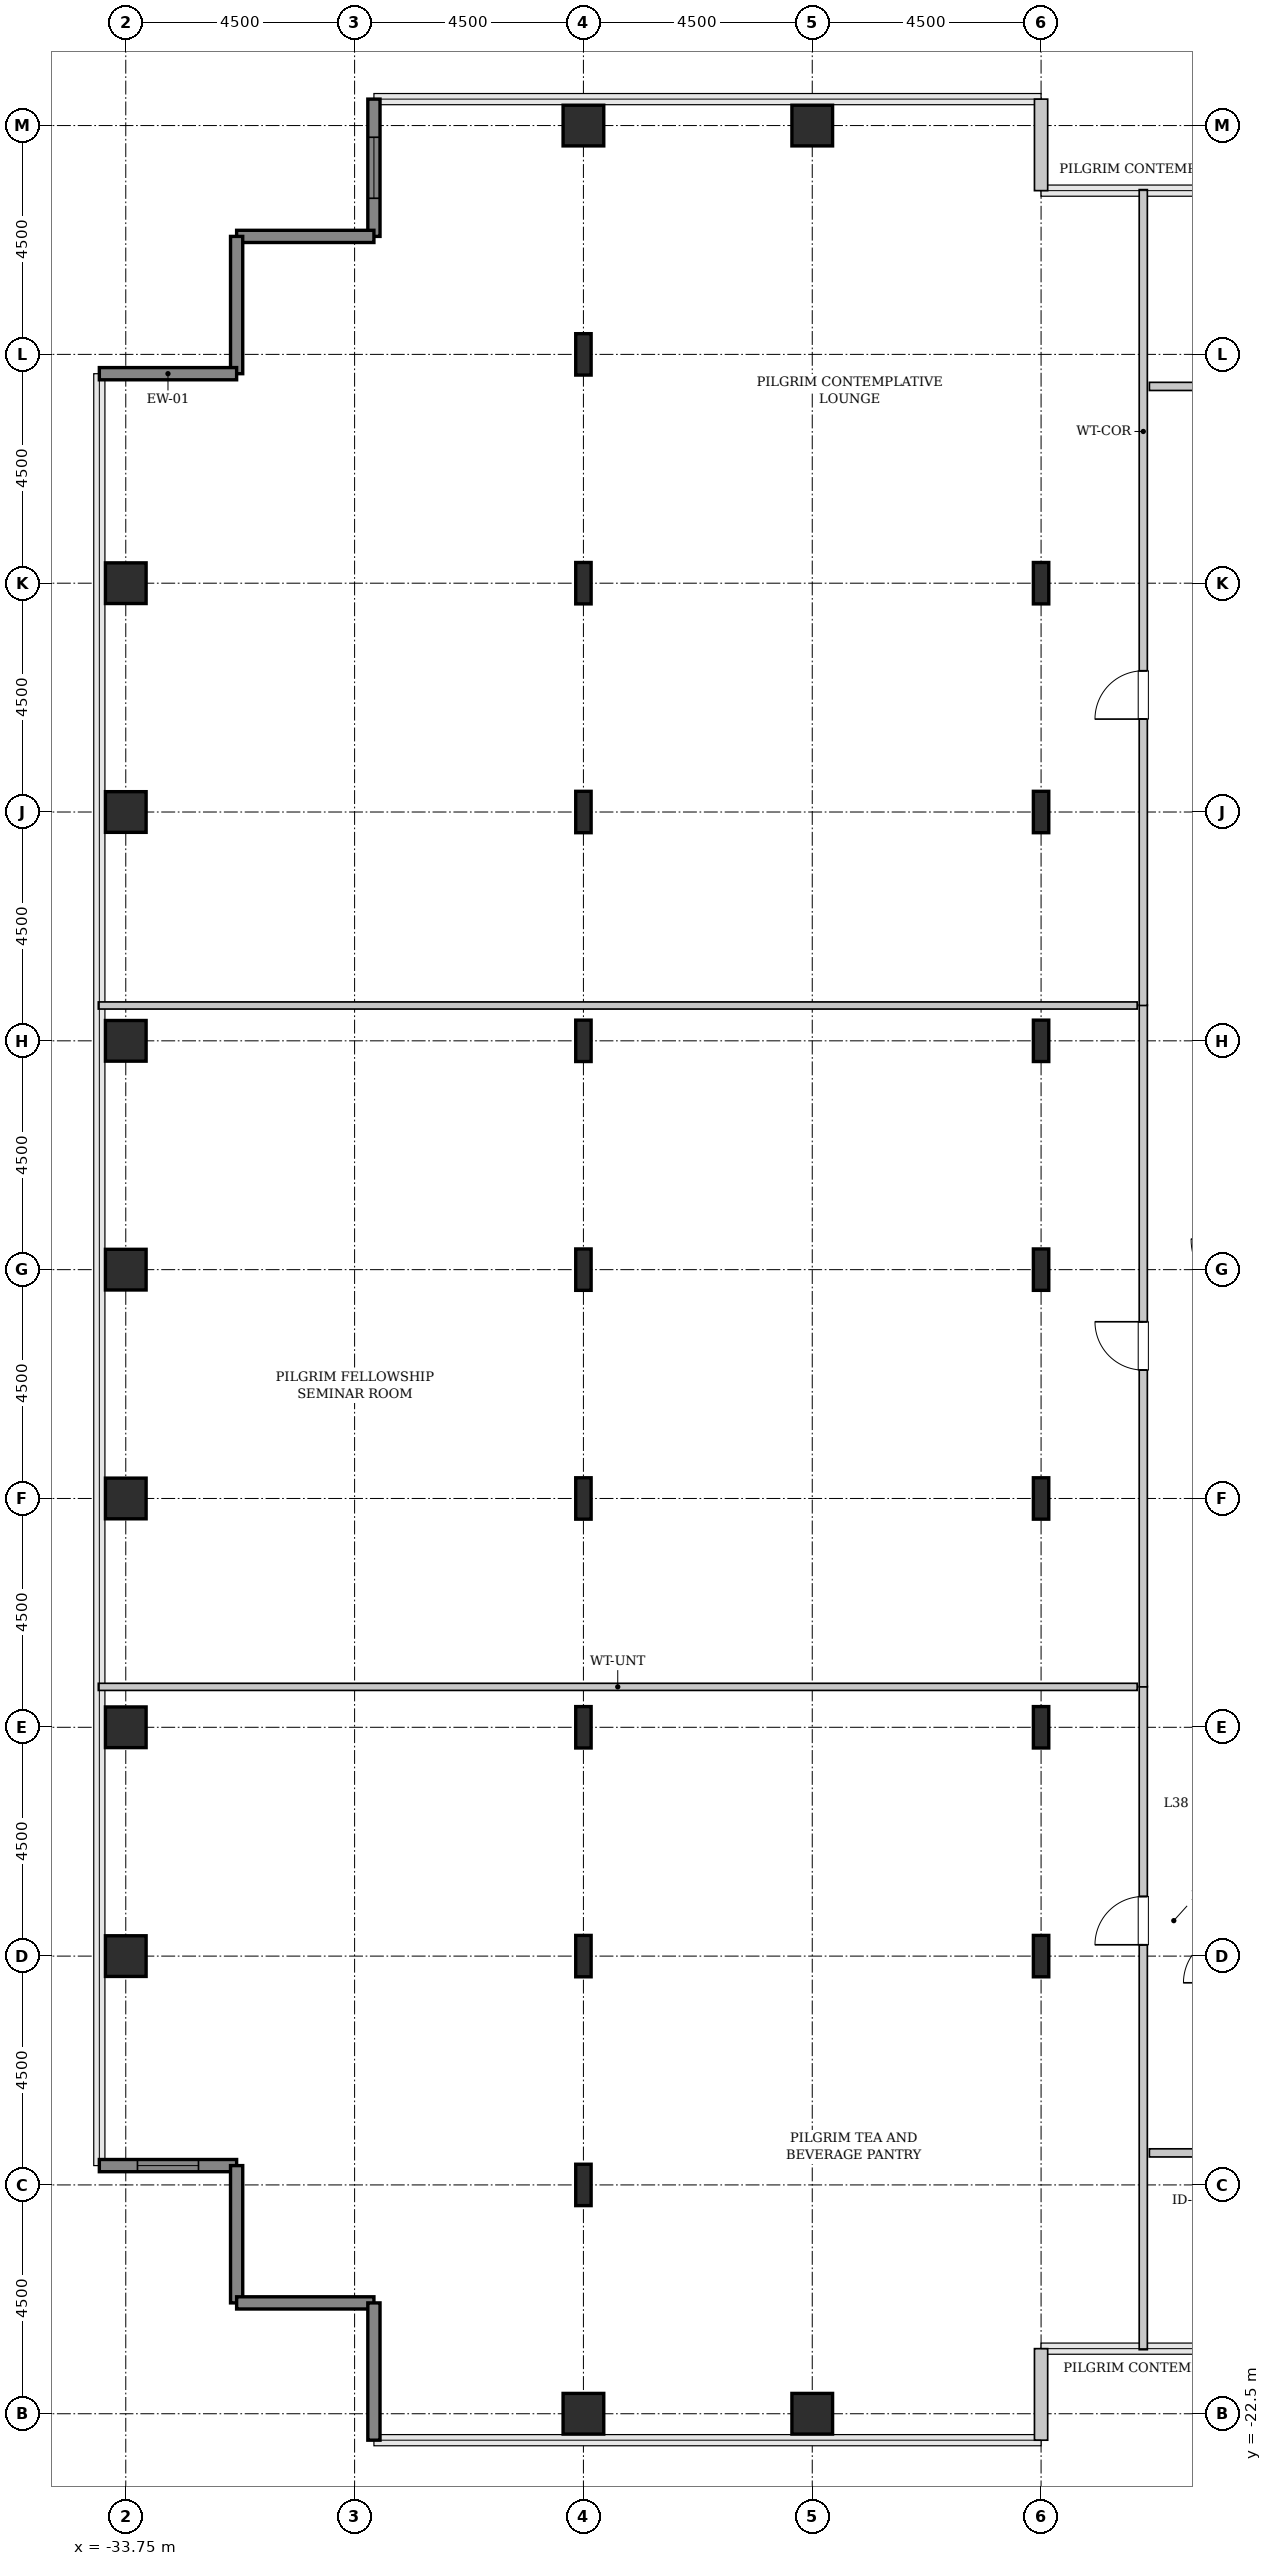
"""IFC4 building model, lengths in metres.
Left out: names, types, materials, properties, quantities, classifications, styles, units other than length and angle.
Written with IfcOpenShell. Run it as: python <this file> out.ifc"""

import sys

from ifc_helpers import new_model, si_unit, direction, frame, frame_2d, origin, origin_2d, place, context, subcontext, project, spatial, rectangle, hollow_rectangle, i_section, extrude, source, transform, mapped, element, fill, save


model = new_model("IFC4")
c1 = context("Model", 3, precision=1e-05, world=origin(), true_north=direction((0.0, 1.0)))
c2 = subcontext(c1, "Body", "Model", "MODEL_VIEW")
j1 = project(units=[si_unit("LENGTHUNIT", "METRE"), si_unit("PLANEANGLEUNIT", "RADIAN")], contexts=[c1])
p1 = place(None, origin())
s1 = spatial("IfcSite", under=j1, at=p1, CompositionType="ELEMENT")
p2 = place(p1, origin())
s2 = spatial("IfcBuilding", under=s1, at=p2, CompositionType="ELEMENT")
p3 = place(p2, frame((0.0, 0.0, 156.4)))
s3 = spatial("IfcBuildingStorey", under=s2, at=p3, CompositionType="ELEMENT", Elevation=156.4)
m1 = source(origin(), c2, "Body", "SweptSolid", [
    extrude(hollow_rectangle(XDim=0.8, YDim=0.8, WallThickness=0.04, InnerFilletRadius=0.04, OuterFilletRadius=0.08, at=origin_2d()), origin(), (0.0, 0.0, 1.0), 3.8),
])
for number, where, z_axis, x_axis in (
    (1, (-33.75, -13.5, 0.0), (0.0, 0.0, 1.0), (1.0, 0.0, 0.0)),
    (2, (-33.75, -9.0, 0.0), (0.0, 0.0, 1.0), (1.0, 0.0, 0.0)),
    (3, (-33.75, -4.5, 0.0), (0.0, 0.0, 1.0), (1.0, 0.0, 0.0)),
    (4, (-33.75, 0.0, 0.0), (0.0, 0.0, 1.0), (1.0, 0.0, 0.0)),
    (5, (-33.75, 4.5, 0.0), (0.0, 0.0, 1.0), (1.0, 0.0, 0.0)),
    (6, (-33.75, 9.0, 0.0), (0.0, 0.0, 1.0), (1.0, 0.0, 0.0)),
    (7, (-33.75, 13.5, 0.0), (0.0, 0.0, 1.0), (1.0, 0.0, 0.0)),
    (8, (-24.75, -22.5, 0.0), (0.0, 0.0, 1.0), (1.0, 0.0, 0.0)),
):
    element("IfcColumn", number, at=place(p3, frame(where, z_axis=z_axis, x_axis=x_axis)), inside=s3, PredefinedType="COLUMN", context=c2, shape_type="MappedRepresentation", body=[
        mapped(m1, transform((0.0, 0.0, 0.0), x_axis=(1.0, 0.0, 0.0), y_axis=(0.0, 1.0, 0.0), z_axis=(0.0, 0.0, 1.0), scale=1.0)),
    ])
m2 = source(origin(), c2, "Body", "SweptSolid", [
    extrude(i_section(OverallWidth=0.303, OverallDepth=0.814, WebThickness=0.021, FlangeThickness=0.04, FilletRadius=0.03, at=origin_2d()), origin(), (0.0, 0.0, 1.0), 3.8),
])
for number, where, z_axis, x_axis in (
    (9, (-24.75, -18.0, 0.0), (0.0, 0.0, 1.0), (1.0, 0.0, 0.0)),
    (10, (-24.75, -13.5, 0.0), (0.0, 0.0, 1.0), (1.0, 0.0, 0.0)),
    (11, (-24.75, -9.0, 0.0), (0.0, 0.0, 1.0), (1.0, 0.0, 0.0)),
    (12, (-24.75, -4.5, 0.0), (0.0, 0.0, 1.0), (1.0, 0.0, 0.0)),
    (13, (-24.75, 0.0, 0.0), (0.0, 0.0, 1.0), (1.0, 0.0, 0.0)),
    (14, (-24.75, 4.5, 0.0), (0.0, 0.0, 1.0), (1.0, 0.0, 0.0)),
    (15, (-24.75, 9.0, 0.0), (0.0, 0.0, 1.0), (1.0, 0.0, 0.0)),
    (16, (-24.75, 13.5, 0.0), (0.0, 0.0, 1.0), (1.0, 0.0, 0.0)),
    (17, (-24.75, 18.0, 0.0), (0.0, 0.0, 1.0), (1.0, 0.0, 0.0)),
):
    element("IfcColumn", number, at=place(p3, frame(where, z_axis=z_axis, x_axis=x_axis)), inside=s3, PredefinedType="COLUMN", context=c2, shape_type="MappedRepresentation", body=[
        mapped(m2, transform((0.0, 0.0, 0.0), x_axis=(1.0, 0.0, 0.0), y_axis=(0.0, 1.0, 0.0), z_axis=(0.0, 0.0, 1.0), scale=1.0)),
    ])
for number, where, z_axis, x_axis in (
    (18, (-24.75, 22.5, 0.0), (0.0, 0.0, 1.0), (1.0, 0.0, 0.0)),
    (19, (-20.25, -22.5, 0.0), (0.0, 0.0, 1.0), (1.0, 0.0, 0.0)),
    (20, (-20.25, 22.5, 0.0), (0.0, 0.0, 1.0), (1.0, 0.0, 0.0)),
):
    element("IfcColumn", number, at=place(p3, frame(where, z_axis=z_axis, x_axis=x_axis)), inside=s3, PredefinedType="COLUMN", context=c2, shape_type="MappedRepresentation", body=[
        mapped(m1, transform((0.0, 0.0, 0.0), x_axis=(1.0, 0.0, 0.0), y_axis=(0.0, 1.0, 0.0), z_axis=(0.0, 0.0, 1.0), scale=1.0)),
    ])
for number, where, z_axis, x_axis in (
    (21, (-15.75, -13.5, 0.0), (0.0, 0.0, 1.0), (1.0, 0.0, 0.0)),
    (22, (-15.75, -9.0, 0.0), (0.0, 0.0, 1.0), (1.0, 0.0, 0.0)),
    (23, (-15.75, -4.5, 0.0), (0.0, 0.0, 1.0), (1.0, 0.0, 0.0)),
    (24, (-15.75, 0.0, 0.0), (0.0, 0.0, 1.0), (1.0, 0.0, 0.0)),
    (25, (-15.75, 4.5, 0.0), (0.0, 0.0, 1.0), (1.0, 0.0, 0.0)),
    (26, (-15.75, 9.0, 0.0), (0.0, 0.0, 1.0), (1.0, 0.0, 0.0)),
    (27, (-15.75, 13.5, 0.0), (0.0, 0.0, 1.0), (1.0, 0.0, 0.0)),
):
    element("IfcColumn", number, at=place(p3, frame(where, z_axis=z_axis, x_axis=x_axis)), inside=s3, PredefinedType="COLUMN", context=c2, shape_type="MappedRepresentation", body=[
        mapped(m2, transform((0.0, 0.0, 0.0), x_axis=(1.0, 0.0, 0.0), y_axis=(0.0, 1.0, 0.0), z_axis=(0.0, 0.0, 1.0), scale=1.0)),
    ])
m3 = source(origin(), c2, "Body", "SweptSolid", [
    extrude(rectangle(XDim=1.8, YDim=0.26, at=frame_2d((0.9, 0.0))), origin(), (0.0, 0.0, 1.0), 3.55),
])
p4 = place(p3, frame((-15.75, 21.22, 0.0), z_axis=(0.0, 0.0, 1.0), x_axis=(0.0, 1.0, 0.0)))
e28 = element("IfcWall", 28, at=p4, inside=s3, PredefinedType="SOLIDWALL", context=c2, shape_type="MappedRepresentation", body=[
    mapped(m3, transform((0.0, 0.0, 0.0), x_axis=(1.0, 0.0, 0.0), y_axis=(0.0, 1.0, 0.0), z_axis=(0.0, 0.0, 1.0), scale=1.0)),
])
m4 = source(origin(), c2, "Body", "SweptSolid", [
    extrude(rectangle(XDim=2.7, YDim=0.24, at=frame_2d((1.35, 0.0))), origin(), (0.0, 0.0, 1.0), 3.55),
])
p5 = place(p3, frame((-28.87, 23.02, 0.0), z_axis=(0.0, 0.0, 1.0), x_axis=(0.0, -1.0, 0.0)))
e29 = element("IfcWall", 29, at=p5, inside=s3, PredefinedType="SHEAR", context=c2, shape_type="MappedRepresentation", body=[
    mapped(m4, transform((0.0, 0.0, 0.0), x_axis=(1.0, 0.0, 0.0), y_axis=(0.0, 1.0, 0.0), z_axis=(0.0, 0.0, 1.0), scale=1.0)),
])
p6 = place(p5, frame((0.75, 0.0, 0.85)))
e30 = element("IfcOpeningElement", 30, at=p6, cuts=e29, PredefinedType="OPENING", context=c2, shape_type="SweptSolid", body=[
    extrude(rectangle(XDim=1.2, YDim=1.8, at=frame_2d((0.6, 0.9))), frame((0.0, 0.13, 0.0), z_axis=(0.0, -1.0, 0.0), x_axis=(1.0, 0.0, 0.0)), (0.0, 0.0, 1.0), 0.26),
])
for number, where, z_axis, x_axis in (
    (31, (-28.87, 20.32, 0.0), (0.0, 0.0, 1.0), (-1.0, 0.0, 0.0)),
    (32, (-31.57, 20.32, 0.0), (0.0, 0.0, 1.0), (0.0, -1.0, 0.0)),
    (33, (-31.57, 17.62, 0.0), (0.0, 0.0, 1.0), (-1.0, 0.0, 0.0)),
):
    element("IfcWall", number, at=place(p3, frame(where, z_axis=z_axis, x_axis=x_axis)), inside=s3, PredefinedType="SHEAR", context=c2, shape_type="MappedRepresentation", body=[
        mapped(m4, transform((0.0, 0.0, 0.0), x_axis=(1.0, 0.0, 0.0), y_axis=(0.0, 1.0, 0.0), z_axis=(0.0, 0.0, 1.0), scale=1.0)),
    ])
p7 = place(p3, frame((-34.27, -17.62, 0.0), z_axis=(0.0, 0.0, 1.0), x_axis=(1.0, 0.0, 0.0)))
e34 = element("IfcWall", 34, at=p7, inside=s3, PredefinedType="SHEAR", context=c2, shape_type="MappedRepresentation", body=[
    mapped(m4, transform((0.0, 0.0, 0.0), x_axis=(1.0, 0.0, 0.0), y_axis=(0.0, 1.0, 0.0), z_axis=(0.0, 0.0, 1.0), scale=1.0)),
])
p8 = place(p7, frame((0.75, 0.0, 0.85)))
e35 = element("IfcOpeningElement", 35, at=p8, cuts=e34, PredefinedType="OPENING", context=c2, shape_type="SweptSolid", body=[
    extrude(rectangle(XDim=1.2, YDim=1.8, at=frame_2d((0.6, 0.9))), frame((0.0, 0.13, 0.0), z_axis=(0.0, -1.0, 0.0), x_axis=(1.0, 0.0, 0.0)), (0.0, 0.0, 1.0), 0.26),
])
for number, where, z_axis, x_axis in (
    (36, (-31.57, -17.62, 0.0), (0.0, 0.0, 1.0), (0.0, -1.0, 0.0)),
    (37, (-31.57, -20.32, 0.0), (0.0, 0.0, 1.0), (1.0, 0.0, 0.0)),
    (38, (-28.87, -20.32, 0.0), (0.0, 0.0, 1.0), (0.0, -1.0, 0.0)),
):
    element("IfcWall", number, at=place(p3, frame(where, z_axis=z_axis, x_axis=x_axis)), inside=s3, PredefinedType="SHEAR", context=c2, shape_type="MappedRepresentation", body=[
        mapped(m4, transform((0.0, 0.0, 0.0), x_axis=(1.0, 0.0, 0.0), y_axis=(0.0, 1.0, 0.0), z_axis=(0.0, 0.0, 1.0), scale=1.0)),
    ])
p9 = place(p3, frame((-15.75, -23.02, 0.0), z_axis=(0.0, 0.0, 1.0), x_axis=(0.0, 1.0, 0.0)))
e39 = element("IfcWall", 39, at=p9, inside=s3, PredefinedType="SOLIDWALL", context=c2, shape_type="MappedRepresentation", body=[
    mapped(m3, transform((0.0, 0.0, 0.0), x_axis=(1.0, 0.0, 0.0), y_axis=(0.0, 1.0, 0.0), z_axis=(0.0, 0.0, 1.0), scale=1.0)),
])
m5 = source(origin(), c2, "Body", "SweptSolid", [
    extrude(rectangle(XDim=13.045, YDim=0.16, at=frame_2d((6.522, 0.0))), origin(), (0.0, 0.0, 1.0), 3.535),
])
p10 = place(p3, frame((-13.74, -21.24, 0.0), z_axis=(0.0, 0.0, 1.0), x_axis=(0.0, 1.0, 0.0)))
e40 = element("IfcWall", 40, at=p10, inside=s3, PredefinedType="PARTITIONING", context=c2, shape_type="MappedRepresentation", body=[
    mapped(m5, transform((0.0, 0.0, 0.0), x_axis=(1.0, 0.0, 0.0), y_axis=(0.0, 1.0, 0.0), z_axis=(0.0, 0.0, 1.0), scale=1.0)),
])
p11 = place(p10, frame((7.962, 0.0, 0.0)))
e41 = element("IfcOpeningElement", 41, at=p11, cuts=e40, PredefinedType="OPENING", context=c2, shape_type="SweptSolid", body=[
    extrude(rectangle(XDim=0.95, YDim=2.1, at=frame_2d((0.475, 1.05))), frame((0.0, 0.09, 0.0), z_axis=(0.0, -1.0, 0.0), x_axis=(1.0, 0.0, 0.0)), (0.0, 0.0, 1.0), 0.18),
])
m6 = source(origin(), c2, "Body", "SweptSolid", [
    extrude(rectangle(XDim=20.43, YDim=0.14, at=frame_2d((10.215, 0.0))), origin(), (0.0, 0.0, 1.0), 3.535),
])
p12 = place(p3, frame((-34.29, -8.205, 0.0), z_axis=(0.0, 0.0, 1.0), x_axis=(1.0, 0.0, 0.0)))
e42 = element("IfcWall", 42, at=p12, inside=s3, PredefinedType="PARTITIONING", context=c2, shape_type="MappedRepresentation", body=[
    mapped(m6, transform((0.0, 0.0, 0.0), x_axis=(1.0, 0.0, 0.0), y_axis=(0.0, 1.0, 0.0), z_axis=(0.0, 0.0, 1.0), scale=1.0)),
])
m7 = source(origin(), c2, "Body", "SweptSolid", [
    extrude(rectangle(XDim=13.41, YDim=0.16, at=frame_2d((6.705, 0.0))), origin(), (0.0, 0.0, 1.0), 3.535),
])
p13 = place(p3, frame((-13.74, -8.205, 0.0), z_axis=(0.0, 0.0, 1.0), x_axis=(0.0, 1.0, 0.0)))
e43 = element("IfcWall", 43, at=p13, inside=s3, PredefinedType="PARTITIONING", context=c2, shape_type="MappedRepresentation", body=[
    mapped(m7, transform((0.0, 0.0, 0.0), x_axis=(1.0, 0.0, 0.0), y_axis=(0.0, 1.0, 0.0), z_axis=(0.0, 0.0, 1.0), scale=1.0)),
])
p14 = place(p13, frame((6.23, 0.0, 0.0)))
e44 = element("IfcOpeningElement", 44, at=p14, cuts=e43, PredefinedType="OPENING", context=c2, shape_type="SweptSolid", body=[
    extrude(rectangle(XDim=0.95, YDim=2.1, at=frame_2d((0.475, 1.05))), frame((0.0, 0.09, 0.0), z_axis=(0.0, -1.0, 0.0), x_axis=(1.0, 0.0, 0.0)), (0.0, 0.0, 1.0), 0.18),
])
p15 = place(p3, frame((-34.29, 5.195, 0.0), z_axis=(0.0, 0.0, 1.0), x_axis=(1.0, 0.0, 0.0)))
e45 = element("IfcWall", 45, at=p15, inside=s3, PredefinedType="PARTITIONING", context=c2, shape_type="MappedRepresentation", body=[
    mapped(m6, transform((0.0, 0.0, 0.0), x_axis=(1.0, 0.0, 0.0), y_axis=(0.0, 1.0, 0.0), z_axis=(0.0, 0.0, 1.0), scale=1.0)),
])
m8 = source(origin(), c2, "Body", "SweptSolid", [
    extrude(rectangle(XDim=16.045, YDim=0.16, at=frame_2d((8.022, 0.0))), origin(), (0.0, 0.0, 1.0), 3.535),
])
p16 = place(p3, frame((-13.74, 5.195, 0.0), z_axis=(0.0, 0.0, 1.0), x_axis=(0.0, 1.0, 0.0)))
e46 = element("IfcWall", 46, at=p16, inside=s3, PredefinedType="PARTITIONING", context=c2, shape_type="MappedRepresentation", body=[
    mapped(m8, transform((0.0, 0.0, 0.0), x_axis=(1.0, 0.0, 0.0), y_axis=(0.0, 1.0, 0.0), z_axis=(0.0, 0.0, 1.0), scale=1.0)),
])
p17 = place(p16, frame((5.633, 0.0, 0.0)))
e47 = element("IfcOpeningElement", 47, at=p17, cuts=e46, PredefinedType="OPENING", context=c2, shape_type="SweptSolid", body=[
    extrude(rectangle(XDim=0.95, YDim=2.1, at=frame_2d((0.475, 1.05))), frame((0.0, 0.09, 0.0), z_axis=(0.0, -1.0, 0.0), x_axis=(1.0, 0.0, 0.0)), (0.0, 0.0, 1.0), 0.18),
])
m9 = source(origin(), c2, "Body", "SweptSolid", [
    extrude(rectangle(XDim=4.16, YDim=0.16, at=frame_2d((2.08, 0.0))), origin(), (0.0, 0.0, 1.0), 3.535),
])
p18 = place(p3, frame((-13.62, 17.37, 0.0), z_axis=(0.0, 0.0, 1.0), x_axis=(1.0, 0.0, 0.0)))
e48 = element("IfcWall", 48, at=p18, inside=s3, PredefinedType="PARTITIONING", context=c2, shape_type="MappedRepresentation", body=[
    mapped(m9, transform((0.0, 0.0, 0.0), x_axis=(1.0, 0.0, 0.0), y_axis=(0.0, 1.0, 0.0), z_axis=(0.0, 0.0, 1.0), scale=1.0)),
])
p19 = place(p18, frame((0.969, 0.0, 0.0)))
e49 = element("IfcOpeningElement", 49, at=p19, cuts=e48, PredefinedType="OPENING", context=c2, shape_type="SweptSolid", body=[
    extrude(rectangle(XDim=0.95, YDim=2.1, at=frame_2d((0.475, 1.05))), frame((0.0, 0.09, 0.0), z_axis=(0.0, -1.0, 0.0), x_axis=(1.0, 0.0, 0.0)), (0.0, 0.0, 1.0), 0.18),
])
m10 = source(origin(), c2, "Body", "SweptSolid", [
    extrude(rectangle(XDim=4.425, YDim=0.16, at=frame_2d((2.212, 0.0))), origin(), (0.0, 0.0, 1.0), 3.535),
])
p20 = place(p3, frame((-13.62, -17.37, 0.0), z_axis=(0.0, 0.0, 1.0), x_axis=(1.0, 0.0, 0.0)))
e50 = element("IfcWall", 50, at=p20, inside=s3, PredefinedType="PARTITIONING", context=c2, shape_type="MappedRepresentation", body=[
    mapped(m10, transform((0.0, 0.0, 0.0), x_axis=(1.0, 0.0, 0.0), y_axis=(0.0, 1.0, 0.0), z_axis=(0.0, 0.0, 1.0), scale=1.0)),
])
p21 = place(p20, frame((1.038, 0.0, 0.0)))
e51 = element("IfcOpeningElement", 51, at=p21, cuts=e50, PredefinedType="OPENING", context=c2, shape_type="SweptSolid", body=[
    extrude(rectangle(XDim=0.95, YDim=2.1, at=frame_2d((0.475, 1.05))), frame((0.0, 0.09, 0.0), z_axis=(0.0, -1.0, 0.0), x_axis=(1.0, 0.0, 0.0)), (0.0, 0.0, 1.0), 0.18),
])
m11 = source(origin(), c2, "Body", "SweptSolid", [
    extrude(rectangle(XDim=1.2, YDim=1.8, at=frame_2d((0.6, 0.9))), frame((0.0, 0.03, 0.0), z_axis=(0.0, -1.0, 0.0), x_axis=(1.0, 0.0, 0.0)), (0.0, 0.0, 1.0), 0.06),
])
p22 = place(p6, origin())
e52 = element("IfcWindow", 52, at=p22, inside=s3, PartitioningType="SINGLE_PANEL", PredefinedType="WINDOW", context=c2, shape_type="MappedRepresentation", body=[
    mapped(m11, transform((0.0, 0.0, 0.0), x_axis=(1.0, 0.0, 0.0), y_axis=(0.0, 1.0, 0.0), z_axis=(0.0, 0.0, 1.0), scale=1.0)),
])
fill(e30, e52)
p23 = place(p8, origin())
e53 = element("IfcWindow", 53, at=p23, inside=s3, PartitioningType="SINGLE_PANEL", PredefinedType="WINDOW", context=c2, shape_type="MappedRepresentation", body=[
    mapped(m11, transform((0.0, 0.0, 0.0), x_axis=(1.0, 0.0, 0.0), y_axis=(0.0, 1.0, 0.0), z_axis=(0.0, 0.0, 1.0), scale=1.0)),
])
fill(e35, e53)
m12 = source(origin(), c2, "Body", "SweptSolid", [
    extrude(rectangle(XDim=0.95, YDim=2.1, at=frame_2d((0.475, 1.05))), frame((0.0, 0.025, 0.0), z_axis=(0.0, -1.0, 0.0), x_axis=(1.0, 0.0, 0.0)), (0.0, 0.0, 1.0), 0.05),
])
p24 = place(p11, origin())
e54 = element("IfcDoor", 54, at=p24, inside=s3, OperationType="SINGLE_SWING_LEFT", PredefinedType="DOOR", context=c2, shape_type="MappedRepresentation", body=[
    mapped(m12, transform((0.0, 0.0, 0.0), x_axis=(1.0, 0.0, 0.0), y_axis=(0.0, 1.0, 0.0), z_axis=(0.0, 0.0, 1.0), scale=1.0)),
])
fill(e41, e54)
p25 = place(p14, origin())
e55 = element("IfcDoor", 55, at=p25, inside=s3, OperationType="SINGLE_SWING_RIGHT", PredefinedType="DOOR", context=c2, shape_type="MappedRepresentation", body=[
    mapped(m12, transform((0.0, 0.0, 0.0), x_axis=(1.0, 0.0, 0.0), y_axis=(0.0, 1.0, 0.0), z_axis=(0.0, 0.0, 1.0), scale=1.0)),
])
fill(e44, e55)
p26 = place(p17, origin())
e56 = element("IfcDoor", 56, at=p26, inside=s3, OperationType="SINGLE_SWING_LEFT", PredefinedType="DOOR", context=c2, shape_type="MappedRepresentation", body=[
    mapped(m12, transform((0.0, 0.0, 0.0), x_axis=(1.0, 0.0, 0.0), y_axis=(0.0, 1.0, 0.0), z_axis=(0.0, 0.0, 1.0), scale=1.0)),
])
fill(e47, e56)
save(model, sys.argv[1])
